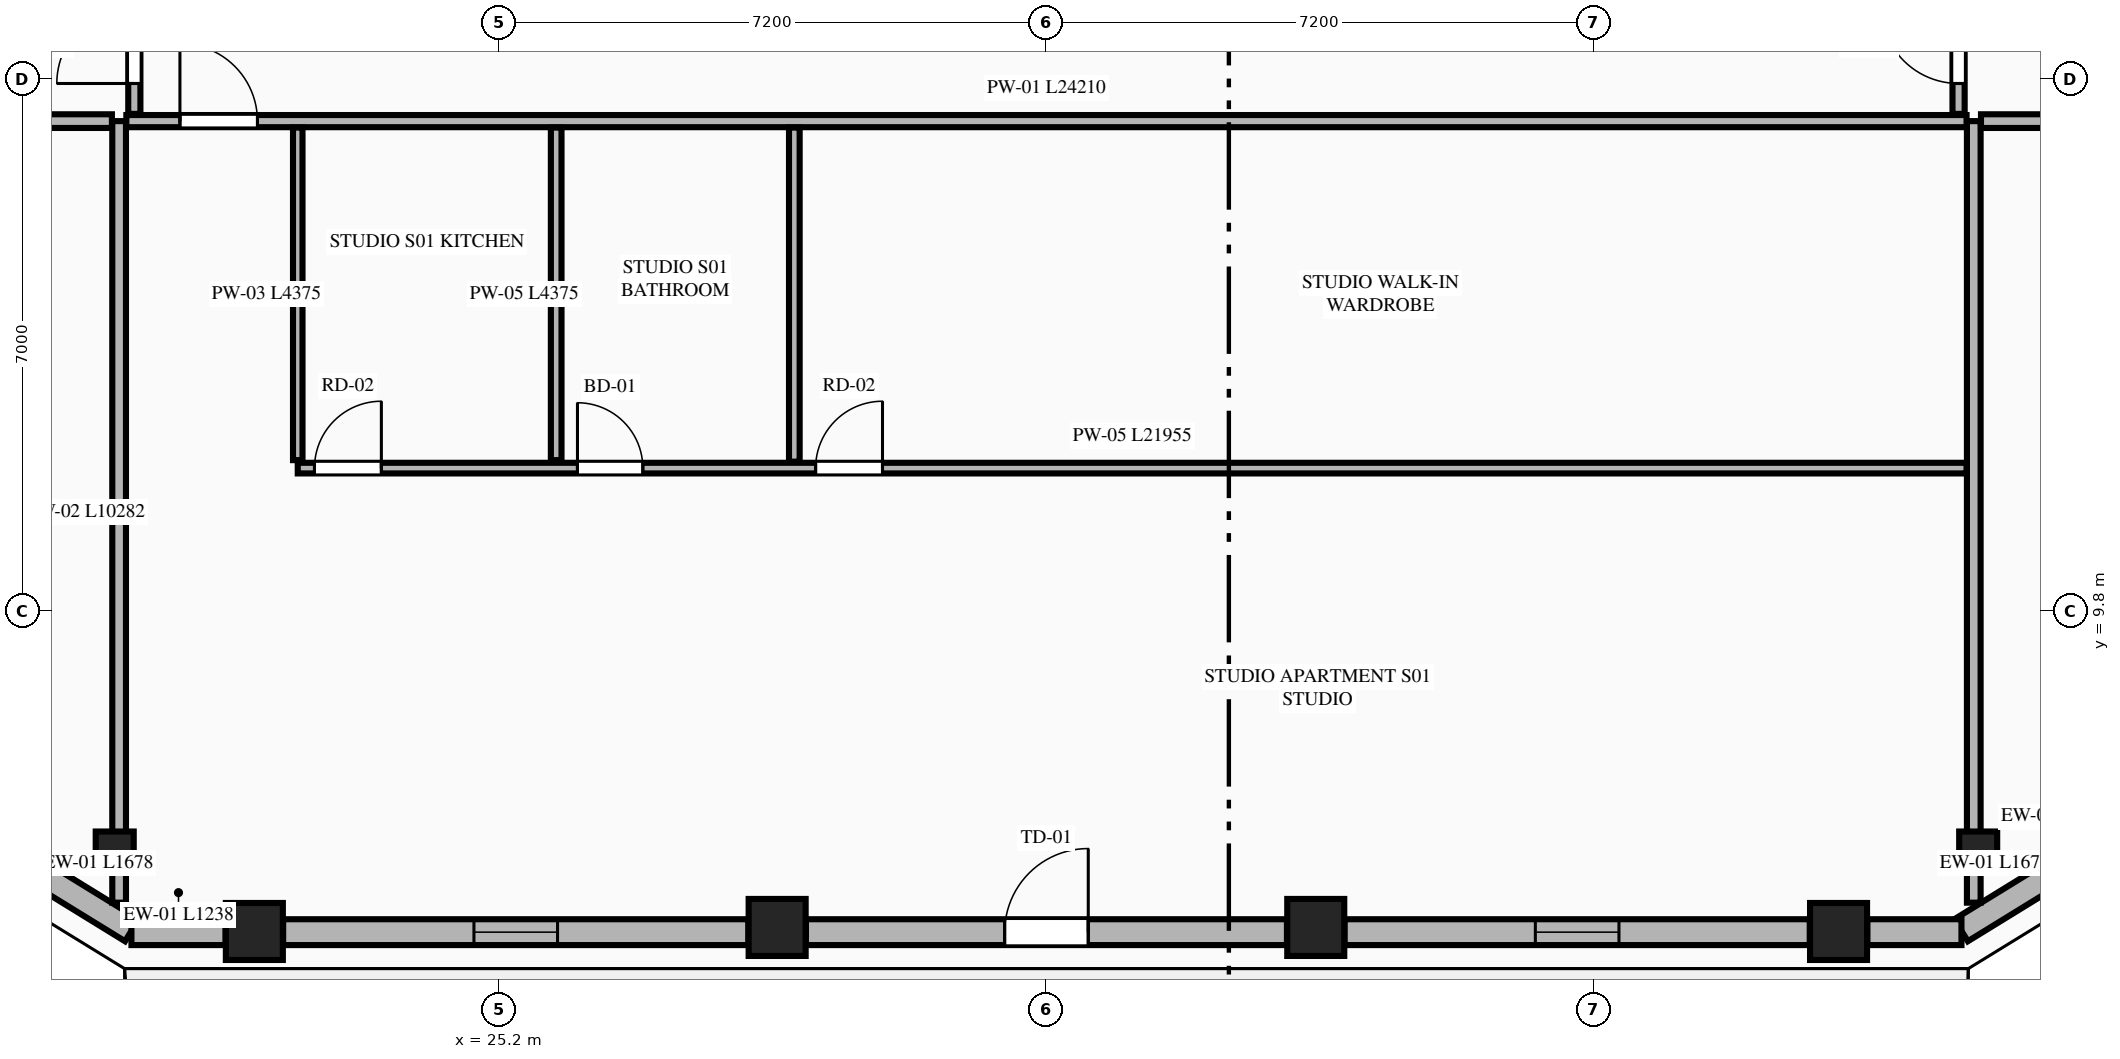
"""IFC4 building model, lengths in metres.
Left out: names, types, materials, properties, quantities, classifications, styles, units other than length and angle.
Written with IfcOpenShell. Run it as: python <this file> out.ifc"""

import sys

from ifc_helpers import new_model, si_unit, direction, frame, frame_2d, origin, origin_2d, place, context, subcontext, project, spatial, rectangle, extrude, element, fill, save


model = new_model("IFC4")
c1 = context("Model", 3, precision=1e-05, world=origin(), true_north=direction((0.0, 1.0)))
c2 = subcontext(c1, "Body", "Model", "MODEL_VIEW")
j1 = project(units=[si_unit("LENGTHUNIT", "METRE"), si_unit("PLANEANGLEUNIT", "RADIAN")], contexts=[c1])
p1 = place(None, origin())
s1 = spatial("IfcSite", under=j1, at=p1, CompositionType="ELEMENT")
p2 = place(p1, origin())
s2 = spatial("IfcBuilding", under=s1, at=p2, CompositionType="ELEMENT")
p3 = place(p2, frame((0.0, 0.0, 218.05)))
s3 = spatial("IfcBuildingStorey", under=s2, at=p3, CompositionType="ELEMENT", Elevation=218.05)
for number, where, z_axis, x_axis in (
    (1, (21.979, 5.589, 0.0), (0.0, 0.0, 1.0), (1.0, 0.0, 0.0)),
    (2, (28.857, 5.642, 0.0), (0.0, 0.0, 1.0), (1.0, 0.0, 0.0)),
    (3, (35.943, 5.642, 0.0), (0.0, 0.0, 1.0), (1.0, 0.0, 0.0)),
    (4, (42.821, 5.589, 0.0), (0.0, 0.0, 1.0), (1.0, 0.0, 0.0)),
):
    element("IfcColumn", number, at=place(p3, frame(where, z_axis=z_axis, x_axis=x_axis)), inside=s3, PredefinedType="COLUMN", context=c2, shape_type="SweptSolid", body=[
        extrude(rectangle(XDim=0.75, YDim=0.75, at=origin_2d()), origin(), (0.0, 0.0, 1.0), 3.55),
    ])
for number, where, z_axis, x_axis in (
    (5, (20.142, 6.654, 0.0), (0.0, 0.0, 1.0), (0.865, -0.501, 0.0)),
    (6, (44.658, 6.654, 0.0), (0.0, 0.0, 1.0), (0.865, 0.501, 0.0)),
):
    element("IfcColumn", number, at=place(p3, frame(where, z_axis=z_axis, x_axis=x_axis)), inside=s3, PredefinedType="PILASTER", context=c2, shape_type="SweptSolid", body=[
        extrude(rectangle(XDim=0.5, YDim=0.35, at=origin_2d()), origin(), (0.0, 0.0, 1.0), 3.55),
    ])
for number, where, z_axis, x_axis in (
    (7, (18.938, 6.484, 0.0), (0.0, 0.0, 1.0), (0.852, -0.524, 0.0)),
    (8, (44.433, 5.605, 0.0), (0.0, 0.0, 1.0), (0.852, 0.524, 0.0)),
):
    element("IfcWall", number, at=place(p3, frame(where, z_axis=z_axis, x_axis=x_axis)), inside=s3, PredefinedType="STANDARD", context=c2, shape_type="SweptSolid", body=[
        extrude(rectangle(XDim=1.678, YDim=0.34, at=frame_2d((0.839, 0.0))), origin(), (0.0, 0.0, 1.0), 3.27),
    ])
p4 = place(p3, frame((20.362, 5.58, 0.0), z_axis=(0.0, 0.0, 1.0), x_axis=(1.0, 0.0, 0.0)))
e9 = element("IfcWall", 9, at=p4, inside=s3, PredefinedType="STANDARD", context=c2, shape_type="SweptSolid", body=[
    extrude(rectangle(XDim=1.238, YDim=0.34, at=frame_2d((0.619, 0.0))), origin(), (0.0, 0.0, 1.0), 3.27),
])
p5 = place(p3, frame((22.358, 5.58, 0.0), z_axis=(0.0, 0.0, 1.0), x_axis=(1.0, 0.0, 0.0)))
e10 = element("IfcWall", 10, at=p5, inside=s3, PredefinedType="STANDARD", context=c2, shape_type="SweptSolid", body=[
    extrude(rectangle(XDim=6.12, YDim=0.34, at=frame_2d((3.06, 0.0))), origin(), (0.0, 0.0, 1.0), 2.803),
])
p6 = place(p5, frame((2.51, 0.0, 0.75)))
e11 = element("IfcOpeningElement", 11, at=p6, cuts=e10, PredefinedType="OPENING", context=c2, shape_type="SweptSolid", body=[
    extrude(rectangle(XDim=1.1, YDim=1.903, at=frame_2d((0.55, 0.952))), frame((0.0, 0.18, 0.0), z_axis=(0.0, -1.0, 0.0), x_axis=(1.0, 0.0, 0.0)), (0.0, 0.0, 1.0), 0.36),
])
p7 = place(p3, frame((29.236, 5.58, 0.0), z_axis=(0.0, 0.0, 1.0), x_axis=(1.0, 0.0, 0.0)))
e12 = element("IfcWall", 12, at=p7, inside=s3, PredefinedType="STANDARD", context=c2, shape_type="SweptSolid", body=[
    extrude(rectangle(XDim=6.328, YDim=0.34, at=frame_2d((3.164, 0.0))), origin(), (0.0, 0.0, 1.0), 2.803),
])
p8 = place(p7, frame((2.614, 0.0, 0.0)))
e13 = element("IfcOpeningElement", 13, at=p8, cuts=e12, PredefinedType="OPENING", context=c2, shape_type="SweptSolid", body=[
    extrude(rectangle(XDim=1.1, YDim=2.25, at=frame_2d((0.55, 1.125))), frame((0.0, 0.18, 0.0), z_axis=(0.0, -1.0, 0.0), x_axis=(1.0, 0.0, 0.0)), (0.0, 0.0, 1.0), 0.36),
])
p9 = place(p3, frame((36.322, 5.58, 0.0), z_axis=(0.0, 0.0, 1.0), x_axis=(1.0, 0.0, 0.0)))
e14 = element("IfcWall", 14, at=p9, inside=s3, PredefinedType="STANDARD", context=c2, shape_type="SweptSolid", body=[
    extrude(rectangle(XDim=6.12, YDim=0.34, at=frame_2d((3.06, 0.0))), origin(), (0.0, 0.0, 1.0), 2.803),
])
p10 = place(p9, frame((2.51, 0.0, 0.75)))
e15 = element("IfcOpeningElement", 15, at=p10, cuts=e14, PredefinedType="OPENING", context=c2, shape_type="SweptSolid", body=[
    extrude(rectangle(XDim=1.1, YDim=1.903, at=frame_2d((0.55, 0.952))), frame((0.0, 0.18, 0.0), z_axis=(0.0, -1.0, 0.0), x_axis=(1.0, 0.0, 0.0)), (0.0, 0.0, 1.0), 0.36),
])
p11 = place(p3, frame((43.2, 5.58, 0.0), z_axis=(0.0, 0.0, 1.0), x_axis=(1.0, 0.0, 0.0)))
e16 = element("IfcWall", 16, at=p11, inside=s3, PredefinedType="STANDARD", context=c2, shape_type="SweptSolid", body=[
    extrude(rectangle(XDim=1.238, YDim=0.34, at=frame_2d((0.619, 0.0))), origin(), (0.0, 0.0, 1.0), 3.27),
])
for number, where, z_axis, x_axis in (
    (17, (20.2, 5.968, 0.0), (0.0, 0.0, 1.0), (0.0, 1.0, 0.0)),
    (18, (44.6, 5.968, 0.0), (0.0, 0.0, 1.0), (0.0, 1.0, 0.0)),
):
    element("IfcWall", number, at=place(p3, frame(where, z_axis=z_axis, x_axis=x_axis)), inside=s3, PredefinedType="PARTITIONING", context=c2, shape_type="SweptSolid", body=[
        extrude(rectangle(XDim=10.282, YDim=0.18, at=frame_2d((5.141, 0.0))), origin(), (0.0, 0.0, 1.0), 3.27),
    ])
p12 = place(p3, frame((20.295, 16.25, 0.0), z_axis=(0.0, 0.0, 1.0), x_axis=(1.0, 0.0, 0.0)))
e19 = element("IfcWall", 19, at=p12, inside=s3, PredefinedType="PARTITIONING", context=c2, shape_type="SweptSolid", body=[
    extrude(rectangle(XDim=24.21, YDim=0.16, at=frame_2d((12.105, 0.0))), origin(), (0.0, 0.0, 1.0), 3.27),
])
p13 = place(p12, frame((0.705, 0.0, 0.0)))
e20 = element("IfcOpeningElement", 20, at=p13, cuts=e19, PredefinedType="OPENING", context=c2, shape_type="SweptSolid", body=[
    extrude(rectangle(XDim=1.02, YDim=2.25, at=frame_2d((0.51, 1.125))), frame((0.0, 0.09, 0.0), z_axis=(0.0, -1.0, 0.0), x_axis=(1.0, 0.0, 0.0)), (0.0, 0.0, 1.0), 0.18),
])
p14 = place(p3, frame((22.55, 11.79, 0.0), z_axis=(0.0, 0.0, 1.0), x_axis=(0.0, 1.0, 0.0)))
e21 = element("IfcWall", 21, at=p14, inside=s3, PredefinedType="PARTITIONING", context=c2, shape_type="SweptSolid", body=[
    extrude(rectangle(XDim=4.375, YDim=0.125, at=frame_2d((2.188, 0.0))), origin(), (0.0, 0.0, 1.0), 2.727),
])
p15 = place(p3, frame((22.55, 11.685, 0.0), z_axis=(0.0, 0.0, 1.0), x_axis=(1.0, 0.0, 0.0)))
e22 = element("IfcWall", 22, at=p15, inside=s3, PredefinedType="PLUMBINGWALL", context=c2, shape_type="SweptSolid", body=[
    extrude(rectangle(XDim=21.955, YDim=0.14, at=frame_2d((10.978, 0.0))), origin(), (0.0, 0.0, 1.0), 3.27),
])
p16 = place(p15, frame((3.68, 0.0, 0.0)))
e23 = element("IfcOpeningElement", 23, at=p16, cuts=e22, PredefinedType="OPENING", context=c2, shape_type="SweptSolid", body=[
    extrude(rectangle(XDim=0.86, YDim=2.1, at=frame_2d((0.43, 1.05))), frame((0.0, 0.08, 0.0), z_axis=(0.0, -1.0, 0.0), x_axis=(1.0, 0.0, 0.0)), (0.0, 0.0, 1.0), 0.16),
])
p17 = place(p15, frame((6.813, 0.0, 0.0)))
e24 = element("IfcOpeningElement", 24, at=p17, cuts=e22, PredefinedType="OPENING", context=c2, shape_type="SweptSolid", body=[
    extrude(rectangle(XDim=0.88, YDim=2.15, at=frame_2d((0.44, 1.075))), frame((0.0, 0.08, 0.0), z_axis=(0.0, -1.0, 0.0), x_axis=(1.0, 0.0, 0.0)), (0.0, 0.0, 1.0), 0.16),
])
p18 = place(p15, frame((0.22, 0.0, 0.0)))
e25 = element("IfcOpeningElement", 25, at=p18, cuts=e22, PredefinedType="OPENING", context=c2, shape_type="SweptSolid", body=[
    extrude(rectangle(XDim=0.88, YDim=2.15, at=frame_2d((0.44, 1.075))), frame((0.0, 0.08, 0.0), z_axis=(0.0, -1.0, 0.0), x_axis=(1.0, 0.0, 0.0)), (0.0, 0.0, 1.0), 0.16),
])
p19 = place(p3, frame((25.95, 11.79, 0.0), z_axis=(0.0, 0.0, 1.0), x_axis=(0.0, 1.0, 0.0)))
e26 = element("IfcWall", 26, at=p19, inside=s3, PredefinedType="PLUMBINGWALL", context=c2, shape_type="SweptSolid", body=[
    extrude(rectangle(XDim=4.375, YDim=0.14, at=frame_2d((2.188, 0.0))), origin(), (0.0, 0.0, 1.0), 3.27),
])
p20 = place(p3, frame((29.083, 11.77, 0.0), z_axis=(0.0, 0.0, 1.0), x_axis=(0.0, 1.0, 0.0)))
e27 = element("IfcWall", 27, at=p20, inside=s3, PredefinedType="PLUMBINGWALL", context=c2, shape_type="SweptSolid", body=[
    extrude(rectangle(XDim=4.395, YDim=0.14, at=frame_2d((2.198, 0.0))), origin(), (0.0, 0.0, 1.0), 3.27),
])
for number, where, z_axis, x_axis in (
    (28, (14.211, 16.25, 0.0), (0.0, 0.0, 1.0), (1.0, 0.0, 0.0)),
    (29, (44.695, 16.25, 0.0), (0.0, 0.0, 1.0), (1.0, 0.0, 0.0)),
):
    element("IfcWall", number, at=place(p3, frame(where, z_axis=z_axis, x_axis=x_axis)), inside=s3, PredefinedType="PARTITIONING", context=c2, shape_type="SweptSolid", body=[
        extrude(rectangle(XDim=5.894, YDim=0.18, at=frame_2d((2.947, 0.0))), origin(), (0.0, 0.0, 1.0), 3.27),
    ])
p21 = place(p3, frame((20.4, 16.345, 0.0), z_axis=(0.0, 0.0, 1.0), x_axis=(0.0, 1.0, 0.0)))
e30 = element("IfcWall", 30, at=p21, inside=s3, PredefinedType="PARTITIONING", context=c2, shape_type="SweptSolid", body=[
    extrude(rectangle(XDim=8.882, YDim=0.16, at=frame_2d((4.441, 0.0))), origin(), (0.0, 0.0, 1.0), 3.27),
])
p22 = place(p21, frame((0.4, 0.0, 0.0)))
e31 = element("IfcOpeningElement", 31, at=p22, cuts=e30, PredefinedType="OPENING", context=c2, shape_type="SweptSolid", body=[
    extrude(rectangle(XDim=1.02, YDim=2.25, at=frame_2d((0.51, 1.125))), frame((0.0, 0.09, 0.0), z_axis=(0.0, -1.0, 0.0), x_axis=(1.0, 0.0, 0.0)), (0.0, 0.0, 1.0), 0.18),
])
p23 = place(p3, frame((44.4, 16.345, 0.0), z_axis=(0.0, 0.0, 1.0), x_axis=(0.0, 1.0, 0.0)))
e32 = element("IfcWall", 32, at=p23, inside=s3, PredefinedType="PARTITIONING", context=c2, shape_type="SweptSolid", body=[
    extrude(rectangle(XDim=9.638, YDim=0.16, at=frame_2d((4.819, 0.0))), origin(), (0.0, 0.0, 1.0), 3.27),
])
p24 = place(p23, frame((0.4, 0.0, 0.0)))
e33 = element("IfcOpeningElement", 33, at=p24, cuts=e32, PredefinedType="OPENING", context=c2, shape_type="SweptSolid", body=[
    extrude(rectangle(XDim=1.02, YDim=2.25, at=frame_2d((0.51, 1.125))), frame((0.0, 0.09, 0.0), z_axis=(0.0, -1.0, 0.0), x_axis=(1.0, 0.0, 0.0)), (0.0, 0.0, 1.0), 0.18),
])
p25 = place(p6, origin())
e34 = element("IfcWindow", 34, at=p25, inside=s3, PartitioningType="SINGLE_PANEL", PredefinedType="WINDOW", context=c2, shape_type="SweptSolid", body=[
    extrude(rectangle(XDim=1.1, YDim=1.903, at=frame_2d((0.55, 0.952))), frame((0.0, 0.03, 0.0), z_axis=(0.0, -1.0, 0.0), x_axis=(1.0, 0.0, 0.0)), (0.0, 0.0, 1.0), 0.06),
])
fill(e11, e34)
p26 = place(p8, origin())
e35 = element("IfcDoor", 35, at=p26, inside=s3, OperationType="SINGLE_SWING_RIGHT", PredefinedType="DOOR", context=c2, shape_type="SweptSolid", body=[
    extrude(rectangle(XDim=1.1, YDim=2.25, at=frame_2d((0.55, 1.125))), frame((0.0, 0.025, 0.0), z_axis=(0.0, -1.0, 0.0), x_axis=(1.0, 0.0, 0.0)), (0.0, 0.0, 1.0), 0.05),
])
fill(e13, e35)
p27 = place(p10, origin())
e36 = element("IfcWindow", 36, at=p27, inside=s3, PartitioningType="SINGLE_PANEL", PredefinedType="WINDOW", context=c2, shape_type="SweptSolid", body=[
    extrude(rectangle(XDim=1.1, YDim=1.903, at=frame_2d((0.55, 0.952))), frame((0.0, 0.03, 0.0), z_axis=(0.0, -1.0, 0.0), x_axis=(1.0, 0.0, 0.0)), (0.0, 0.0, 1.0), 0.06),
])
fill(e15, e36)
p28 = place(p16, origin())
e37 = element("IfcDoor", 37, at=p28, inside=s3, OperationType="SINGLE_SWING_LEFT", PredefinedType="DOOR", context=c2, shape_type="SweptSolid", body=[
    extrude(rectangle(XDim=0.86, YDim=2.1, at=frame_2d((0.43, 1.05))), frame((0.0, 0.025, 0.0), z_axis=(0.0, -1.0, 0.0), x_axis=(1.0, 0.0, 0.0)), (0.0, 0.0, 1.0), 0.05),
])
fill(e23, e37)
p29 = place(p17, origin())
e38 = element("IfcDoor", 38, at=p29, inside=s3, OperationType="SINGLE_SWING_RIGHT", PredefinedType="DOOR", context=c2, shape_type="SweptSolid", body=[
    extrude(rectangle(XDim=0.88, YDim=2.15, at=frame_2d((0.44, 1.075))), frame((0.0, 0.025, 0.0), z_axis=(0.0, -1.0, 0.0), x_axis=(1.0, 0.0, 0.0)), (0.0, 0.0, 1.0), 0.05),
])
fill(e24, e38)
p30 = place(p13, origin())
e39 = element("IfcDoor", 39, at=p30, inside=s3, OperationType="SINGLE_SWING_LEFT", PredefinedType="DOOR", context=c2, shape_type="SweptSolid", body=[
    extrude(rectangle(XDim=1.02, YDim=2.25, at=frame_2d((0.51, 1.125))), frame((0.0, 0.025, 0.0), z_axis=(0.0, -1.0, 0.0), x_axis=(1.0, 0.0, 0.0)), (0.0, 0.0, 1.0), 0.05),
])
fill(e20, e39)
p31 = place(p18, origin())
e40 = element("IfcDoor", 40, at=p31, inside=s3, OperationType="SINGLE_SWING_RIGHT", PredefinedType="DOOR", context=c2, shape_type="SweptSolid", body=[
    extrude(rectangle(XDim=0.88, YDim=2.15, at=frame_2d((0.44, 1.075))), frame((0.0, 0.025, 0.0), z_axis=(0.0, -1.0, 0.0), x_axis=(1.0, 0.0, 0.0)), (0.0, 0.0, 1.0), 0.05),
])
fill(e25, e40)
p32 = place(p22, origin())
e41 = element("IfcDoor", 41, at=p32, inside=s3, OperationType="SINGLE_SWING_LEFT", PredefinedType="DOOR", context=c2, shape_type="SweptSolid", body=[
    extrude(rectangle(XDim=1.02, YDim=2.25, at=frame_2d((0.51, 1.125))), frame((0.0, 0.025, 0.0), z_axis=(0.0, -1.0, 0.0), x_axis=(1.0, 0.0, 0.0)), (0.0, 0.0, 1.0), 0.05),
])
fill(e31, e41)
p33 = place(p24, origin())
e42 = element("IfcDoor", 42, at=p33, inside=s3, OperationType="SINGLE_SWING_RIGHT", PredefinedType="DOOR", context=c2, shape_type="SweptSolid", body=[
    extrude(rectangle(XDim=1.02, YDim=2.25, at=frame_2d((0.51, 1.125))), frame((0.0, 0.025, 0.0), z_axis=(0.0, -1.0, 0.0), x_axis=(1.0, 0.0, 0.0)), (0.0, 0.0, 1.0), 0.05),
])
fill(e33, e42)
save(model, sys.argv[1])
